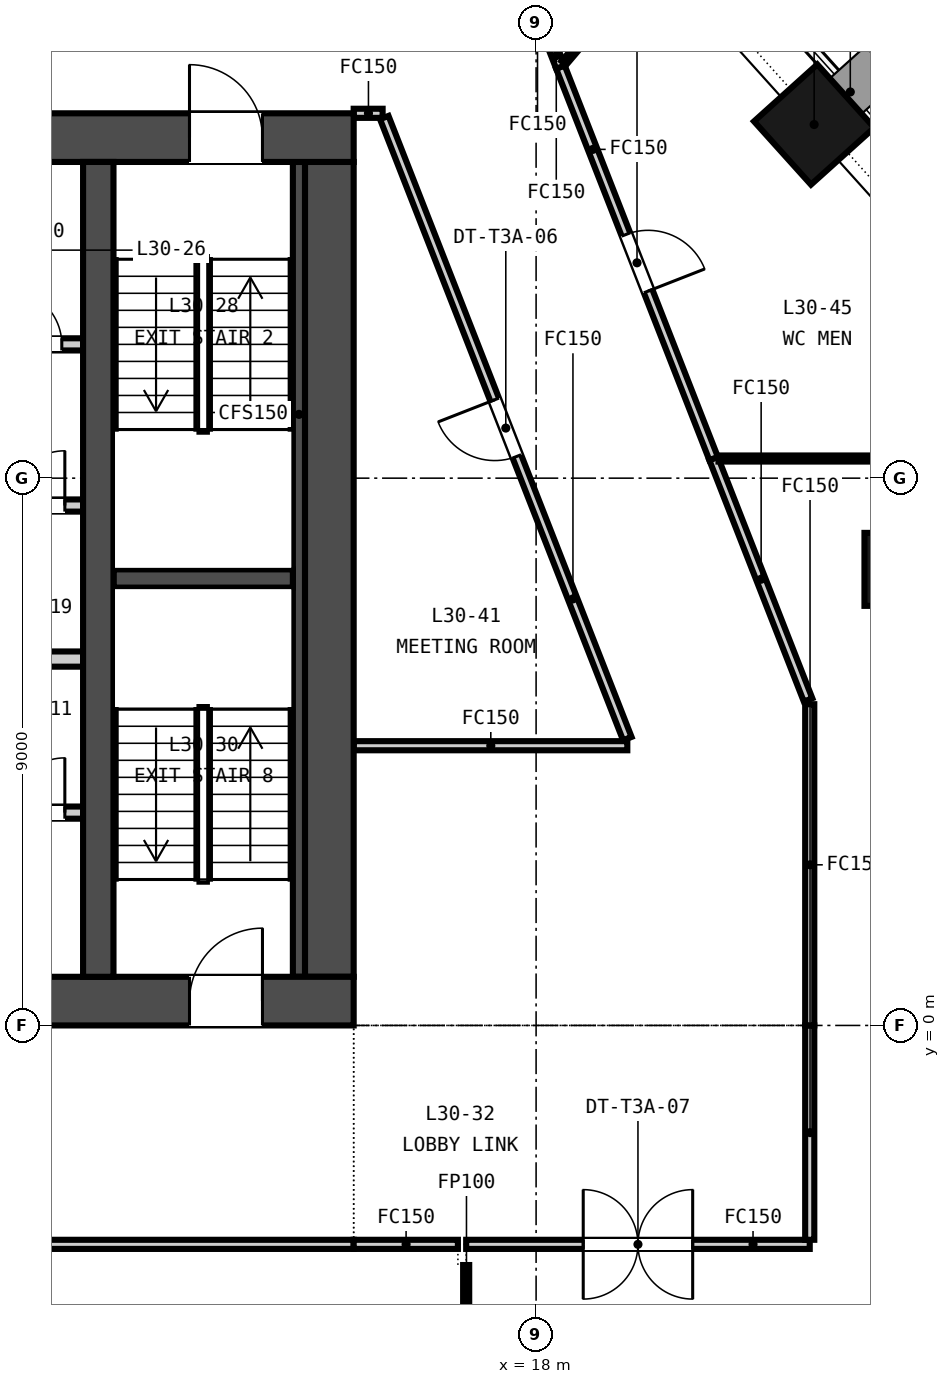
"""IFC4 building model, lengths in metres.
Left out: names, types, materials, properties, quantities, classifications, styles, units other than length and angle.
Written with IfcOpenShell. Run it as: python <this file> out.ifc"""

import sys

from ifc_helpers import new_model, si_unit, direction, frame, frame_2d, origin, origin_2d, place, context, subcontext, project, spatial, rectangle, extrude, element, fill, save


model = new_model("IFC4")
c1 = context("Model", 3, precision=1e-05, world=origin(), true_north=direction((0.0, 1.0)))
c2 = subcontext(c1, "Body", "Model", "MODEL_VIEW")
j1 = project(units=[si_unit("LENGTHUNIT", "METRE"), si_unit("PLANEANGLEUNIT", "RADIAN")], contexts=[c1])
p1 = place(None, origin())
s1 = spatial("IfcSite", under=j1, at=p1, CompositionType="ELEMENT")
p2 = place(p1, origin())
s2 = spatial("IfcBuilding", under=s1, at=p2, CompositionType="ELEMENT")
p3 = place(p2, frame((0.0, 0.0, 126.15)))
s3 = spatial("IfcBuildingStorey", under=s2, at=p3, CompositionType="ELEMENT", Elevation=126.15)
p4 = place(p3, frame((-15.0, 0.4, -0.15), z_axis=(0.0, 0.0, 1.0), x_axis=(1.0, 0.0, 0.0)))
e1 = element("IfcWall", 1, at=p4, inside=s3, PredefinedType="SOLIDWALL", context=c2, shape_type="SweptSolid", body=[
    extrude(rectangle(XDim=30.0, YDim=0.8, at=frame_2d((15.0, 0.0))), origin(), (0.0, 0.0, 1.0), 3.65),
])
p5 = place(p4, frame((5.8, 0.0, 0.15)))
e2 = element("IfcOpeningElement", 2, at=p5, cuts=e1, PredefinedType="OPENING", context=c2, shape_type="SweptSolid", body=[
    extrude(rectangle(XDim=2.4, YDim=2.4, at=frame_2d((1.2, 1.2))), frame((0.0, 0.41, 0.0), z_axis=(0.0, -1.0, 0.0), x_axis=(1.0, 0.0, 0.0)), (0.0, 0.0, 1.0), 0.82),
])
p6 = place(p4, frame((13.8, 0.0, 0.15)))
e3 = element("IfcOpeningElement", 3, at=p6, cuts=e1, PredefinedType="OPENING", context=c2, shape_type="SweptSolid", body=[
    extrude(rectangle(XDim=2.4, YDim=2.4, at=frame_2d((1.2, 1.2))), frame((0.0, 0.41, 0.0), z_axis=(0.0, -1.0, 0.0), x_axis=(1.0, 0.0, 0.0)), (0.0, 0.0, 1.0), 0.82),
])
p7 = place(p4, frame((21.8, 0.0, 0.15)))
e4 = element("IfcOpeningElement", 4, at=p7, cuts=e1, PredefinedType="OPENING", context=c2, shape_type="SweptSolid", body=[
    extrude(rectangle(XDim=2.4, YDim=2.4, at=frame_2d((1.2, 1.2))), frame((0.0, 0.41, 0.0), z_axis=(0.0, -1.0, 0.0), x_axis=(1.0, 0.0, 0.0)), (0.0, 0.0, 1.0), 0.82),
])
p8 = place(p4, frame((1.5, 0.0, 0.15)))
e5 = element("IfcOpeningElement", 5, at=p8, cuts=e1, PredefinedType="OPENING", context=c2, shape_type="SweptSolid", body=[
    extrude(rectangle(XDim=1.2, YDim=2.1, at=frame_2d((0.6, 1.05))), frame((0.0, 0.41, 0.0), z_axis=(0.0, -1.0, 0.0), x_axis=(1.0, 0.0, 0.0)), (0.0, 0.0, 1.0), 0.82),
])
p9 = place(p4, frame((27.3, 0.0, 0.15)))
e6 = element("IfcOpeningElement", 6, at=p9, cuts=e1, PredefinedType="OPENING", context=c2, shape_type="SweptSolid", body=[
    extrude(rectangle(XDim=1.2, YDim=2.1, at=frame_2d((0.6, 1.05))), frame((0.0, 0.41, 0.0), z_axis=(0.0, -1.0, 0.0), x_axis=(1.0, 0.0, 0.0)), (0.0, 0.0, 1.0), 0.82),
])
p10 = place(p3, frame((-15.0, 14.6, -0.15), z_axis=(0.0, 0.0, 1.0), x_axis=(1.0, 0.0, 0.0)))
e7 = element("IfcWall", 7, at=p10, inside=s3, PredefinedType="SOLIDWALL", context=c2, shape_type="SweptSolid", body=[
    extrude(rectangle(XDim=30.0, YDim=0.8, at=frame_2d((15.0, 0.0))), origin(), (0.0, 0.0, 1.0), 3.65),
])
p11 = place(p10, frame((9.25, 0.0, 0.15)))
e8 = element("IfcOpeningElement", 8, at=p11, cuts=e7, PredefinedType="OPENING", context=c2, shape_type="SweptSolid", body=[
    extrude(rectangle(XDim=1.5, YDim=2.1, at=frame_2d((0.75, 1.05))), frame((0.0, 0.41, 0.0), z_axis=(0.0, -1.0, 0.0), x_axis=(1.0, 0.0, 0.0)), (0.0, 0.0, 1.0), 0.82),
])
p12 = place(p10, frame((19.4, 0.0, 0.15)))
e9 = element("IfcOpeningElement", 9, at=p12, cuts=e7, PredefinedType="OPENING", context=c2, shape_type="SweptSolid", body=[
    extrude(rectangle(XDim=1.5, YDim=2.1, at=frame_2d((0.75, 1.05))), frame((0.0, 0.41, 0.0), z_axis=(0.0, -1.0, 0.0), x_axis=(1.0, 0.0, 0.0)), (0.0, 0.0, 1.0), 0.82),
])
p13 = place(p10, frame((1.5, 0.0, 0.15)))
e10 = element("IfcOpeningElement", 10, at=p13, cuts=e7, PredefinedType="OPENING", context=c2, shape_type="SweptSolid", body=[
    extrude(rectangle(XDim=1.2, YDim=2.1, at=frame_2d((0.6, 1.05))), frame((0.0, 0.41, 0.0), z_axis=(0.0, -1.0, 0.0), x_axis=(1.0, 0.0, 0.0)), (0.0, 0.0, 1.0), 0.82),
])
p14 = place(p10, frame((27.3, 0.0, 0.15)))
e11 = element("IfcOpeningElement", 11, at=p14, cuts=e7, PredefinedType="OPENING", context=c2, shape_type="SweptSolid", body=[
    extrude(rectangle(XDim=1.2, YDim=2.1, at=frame_2d((0.6, 1.05))), frame((0.0, 0.41, 0.0), z_axis=(0.0, -1.0, 0.0), x_axis=(1.0, 0.0, 0.0)), (0.0, 0.0, 1.0), 0.82),
])
p15 = place(p3, frame((14.6, 0.8, -0.15), z_axis=(0.0, 0.0, 1.0), x_axis=(0.0, 1.0, 0.0)))
e12 = element("IfcWall", 12, at=p15, inside=s3, PredefinedType="SOLIDWALL", context=c2, shape_type="SweptSolid", body=[
    extrude(rectangle(XDim=13.4, YDim=0.8, at=frame_2d((6.7, 0.0))), origin(), (0.0, 0.0, 1.0), 3.65),
])
p16 = place(p3, frame((10.8, 0.8, -0.15), z_axis=(0.0, 0.0, 1.0), x_axis=(0.0, 1.0, 0.0)))
e13 = element("IfcWall", 13, at=p16, inside=s3, PredefinedType="SOLIDWALL", context=c2, shape_type="SweptSolid", body=[
    extrude(rectangle(XDim=13.4, YDim=0.5, at=frame_2d((6.7, 0.0))), origin(), (0.0, 0.0, 1.0), 3.65),
])
p17 = place(p3, frame((22.573, 14.816, -0.15), z_axis=(0.0, 0.0, 1.0), x_axis=(-0.669130606359, 0.743144825477, 0.0)))
e14 = element("IfcColumn", 14, at=p17, inside=s3, PredefinedType="COLUMN", context=c2, shape_type="SweptSolid", body=[
    extrude(rectangle(XDim=1.4, YDim=1.4, at=origin_2d()), origin(), (0.0, 0.0, 1.0), 3.65),
])
p18 = place(p3, frame((24.0, 7.5, -0.15), z_axis=(0.0, 0.0, 1.0), x_axis=(1.0, 0.0, 0.0)))
e15 = element("IfcColumn", 15, at=p18, inside=s3, PredefinedType="COLUMN", context=c2, shape_type="SweptSolid", body=[
    extrude(rectangle(XDim=1.2, YDim=1.2, at=origin_2d()), origin(), (0.0, 0.0, 1.0), 3.65),
])
p19 = place(p3, frame((-10.55, 3.5, 0.0), z_axis=(0.0, 0.0, 1.0), x_axis=(1.0, 0.0, 0.0)))
e16 = element("IfcWall", 16, at=p19, inside=s3, PredefinedType="PARTITIONING", context=c2, shape_type="SweptSolid", body=[
    extrude(rectangle(XDim=21.1, YDim=0.2, at=frame_2d((10.55, 0.0))), origin(), (0.0, 0.0, 1.0), 3.5),
])
p20 = place(p19, frame((19.9, 0.0, 0.0)))
e17 = element("IfcOpeningElement", 17, at=p20, cuts=e16, PredefinedType="OPENING", context=c2, shape_type="SweptSolid", body=[
    extrude(rectangle(XDim=0.9, YDim=2.1, at=frame_2d((0.45, 1.05))), frame((0.0, 0.11, 0.0), z_axis=(0.0, -1.0, 0.0), x_axis=(1.0, 0.0, 0.0)), (0.0, 0.0, 1.0), 0.22),
])
p21 = place(p3, frame((-10.55, 6.025, 0.0), z_axis=(0.0, 0.0, 1.0), x_axis=(1.0, 0.0, 0.0)))
e18 = element("IfcWall", 18, at=p21, inside=s3, PredefinedType="PARTITIONING", context=c2, shape_type="SweptSolid", body=[
    extrude(rectangle(XDim=21.1, YDim=0.25, at=frame_2d((10.55, 0.0))), origin(), (0.0, 0.0, 1.0), 3.5),
])
p22 = place(p3, frame((-10.55, 8.55, 0.0), z_axis=(0.0, 0.0, 1.0), x_axis=(1.0, 0.0, 0.0)))
e19 = element("IfcWall", 19, at=p22, inside=s3, PredefinedType="PARTITIONING", context=c2, shape_type="SweptSolid", body=[
    extrude(rectangle(XDim=21.1, YDim=0.2, at=frame_2d((10.55, 0.0))), origin(), (0.0, 0.0, 1.0), 3.5),
])
p23 = place(p22, frame((0.675, 0.0, 0.0)))
e20 = element("IfcOpeningElement", 20, at=p23, cuts=e19, PredefinedType="OPENING", context=c2, shape_type="SweptSolid", body=[
    extrude(rectangle(XDim=1.2, YDim=2.1, at=frame_2d((0.6, 1.05))), frame((0.0, 0.11, 0.0), z_axis=(0.0, -1.0, 0.0), x_axis=(1.0, 0.0, 0.0)), (0.0, 0.0, 1.0), 0.22),
])
p24 = place(p22, frame((3.475, 0.0, 0.0)))
e21 = element("IfcOpeningElement", 21, at=p24, cuts=e19, PredefinedType="OPENING", context=c2, shape_type="SweptSolid", body=[
    extrude(rectangle(XDim=1.2, YDim=2.1, at=frame_2d((0.6, 1.05))), frame((0.0, 0.11, 0.0), z_axis=(0.0, -1.0, 0.0), x_axis=(1.0, 0.0, 0.0)), (0.0, 0.0, 1.0), 0.22),
])
p25 = place(p22, frame((6.275, 0.0, 0.0)))
e22 = element("IfcOpeningElement", 22, at=p25, cuts=e19, PredefinedType="OPENING", context=c2, shape_type="SweptSolid", body=[
    extrude(rectangle(XDim=1.2, YDim=2.1, at=frame_2d((0.6, 1.05))), frame((0.0, 0.11, 0.0), z_axis=(0.0, -1.0, 0.0), x_axis=(1.0, 0.0, 0.0)), (0.0, 0.0, 1.0), 0.22),
])
p26 = place(p22, frame((9.075, 0.0, 0.0)))
e23 = element("IfcOpeningElement", 23, at=p26, cuts=e19, PredefinedType="OPENING", context=c2, shape_type="SweptSolid", body=[
    extrude(rectangle(XDim=1.2, YDim=2.1, at=frame_2d((0.6, 1.05))), frame((0.0, 0.11, 0.0), z_axis=(0.0, -1.0, 0.0), x_axis=(1.0, 0.0, 0.0)), (0.0, 0.0, 1.0), 0.22),
])
p27 = place(p22, frame((11.875, 0.0, 0.0)))
e24 = element("IfcOpeningElement", 24, at=p27, cuts=e19, PredefinedType="OPENING", context=c2, shape_type="SweptSolid", body=[
    extrude(rectangle(XDim=1.2, YDim=2.1, at=frame_2d((0.6, 1.05))), frame((0.0, 0.11, 0.0), z_axis=(0.0, -1.0, 0.0), x_axis=(1.0, 0.0, 0.0)), (0.0, 0.0, 1.0), 0.22),
])
p28 = place(p22, frame((14.675, 0.0, 0.0)))
e25 = element("IfcOpeningElement", 25, at=p28, cuts=e19, PredefinedType="OPENING", context=c2, shape_type="SweptSolid", body=[
    extrude(rectangle(XDim=1.2, YDim=2.1, at=frame_2d((0.6, 1.05))), frame((0.0, 0.11, 0.0), z_axis=(0.0, -1.0, 0.0), x_axis=(1.0, 0.0, 0.0)), (0.0, 0.0, 1.0), 0.22),
])
p29 = place(p22, frame((17.475, 0.0, 0.0)))
e26 = element("IfcOpeningElement", 26, at=p29, cuts=e19, PredefinedType="OPENING", context=c2, shape_type="SweptSolid", body=[
    extrude(rectangle(XDim=1.2, YDim=2.1, at=frame_2d((0.6, 1.05))), frame((0.0, 0.11, 0.0), z_axis=(0.0, -1.0, 0.0), x_axis=(1.0, 0.0, 0.0)), (0.0, 0.0, 1.0), 0.22),
])
p30 = place(p22, frame((19.9, 0.0, 0.0)))
e27 = element("IfcOpeningElement", 27, at=p30, cuts=e19, PredefinedType="OPENING", context=c2, shape_type="SweptSolid", body=[
    extrude(rectangle(XDim=0.9, YDim=2.1, at=frame_2d((0.45, 1.05))), frame((0.0, 0.11, 0.0), z_axis=(0.0, -1.0, 0.0), x_axis=(1.0, 0.0, 0.0)), (0.0, 0.0, 1.0), 0.22),
])
p31 = place(p3, frame((5.9, 11.2, 0.0), z_axis=(0.0, 0.0, 1.0), x_axis=(1.0, 0.0, 0.0)))
e28 = element("IfcWall", 28, at=p31, inside=s3, PredefinedType="PARTITIONING", context=c2, shape_type="SweptSolid", body=[
    extrude(rectangle(XDim=4.65, YDim=0.2, at=frame_2d((2.325, 0.0))), origin(), (0.0, 0.0, 1.0), 3.5),
])
p32 = place(p31, frame((3.4, 0.0, 0.0)))
e29 = element("IfcOpeningElement", 29, at=p32, cuts=e28, PredefinedType="OPENING", context=c2, shape_type="SweptSolid", body=[
    extrude(rectangle(XDim=0.9, YDim=2.1, at=frame_2d((0.45, 1.05))), frame((0.0, 0.11, 0.0), z_axis=(0.0, -1.0, 0.0), x_axis=(1.0, 0.0, 0.0)), (0.0, 0.0, 1.0), 0.22),
])
p33 = place(p3, frame((11.05, 7.35, 0.0), z_axis=(0.0, 0.0, 1.0), x_axis=(1.0, 0.0, 0.0)))
e30 = element("IfcWall", 30, at=p33, inside=s3, PredefinedType="SOLIDWALL", context=c2, shape_type="SweptSolid", body=[
    extrude(rectangle(XDim=2.95, YDim=0.3, at=frame_2d((1.475, 0.0))), origin(), (0.0, 0.0, 1.0), 3.5),
])
p34 = place(p3, frame((14.1, 0.8, 0.0), z_axis=(0.0, 0.0, 1.0), x_axis=(0.0, 1.0, 0.0)))
e31 = element("IfcWall", 31, at=p34, inside=s3, PredefinedType="SOLIDWALL", context=c2, shape_type="SweptSolid", body=[
    extrude(rectangle(XDim=13.4, YDim=0.2, at=frame_2d((6.7, 0.0))), origin(), (0.0, 0.0, 1.0), 3.5),
])
p35 = place(p3, frame((15.0, -3.6, 0.0), z_axis=(0.0, 0.0, 1.0), x_axis=(-1.0, 0.0, 0.0)))
e32 = element("IfcWall", 32, at=p35, inside=s3, PredefinedType="PARTITIONING", context=c2, shape_type="SweptSolid", body=[
    extrude(rectangle(XDim=30.0, YDim=0.15, at=frame_2d((15.0, 0.0))), origin(), (0.0, 0.0, 1.0), 2.741),
])
p36 = place(p35, frame((14.1, 0.0, 0.0)))
e33 = element("IfcOpeningElement", 33, at=p36, cuts=e32, PredefinedType="OPENING", context=c2, shape_type="SweptSolid", body=[
    extrude(rectangle(XDim=1.8, YDim=2.1, at=frame_2d((0.9, 1.05))), frame((0.0, 0.085, 0.0), z_axis=(0.0, -1.0, 0.0), x_axis=(1.0, 0.0, 0.0)), (0.0, 0.0, 1.0), 0.17),
])
p37 = place(p3, frame((22.5, -3.6, 0.0), z_axis=(0.0, 0.0, 1.0), x_axis=(-1.0, 0.0, 0.0)))
e34 = element("IfcWall", 34, at=p37, inside=s3, PredefinedType="PARTITIONING", context=c2, shape_type="SweptSolid", body=[
    extrude(rectangle(XDim=5.65, YDim=0.15, at=frame_2d((2.825, 0.0))), origin(), (0.0, 0.0, 1.0), 2.741),
])
p38 = place(p37, frame((1.925, 0.0, 0.0)))
e35 = element("IfcOpeningElement", 35, at=p38, cuts=e34, PredefinedType="OPENING", context=c2, shape_type="SweptSolid", body=[
    extrude(rectangle(XDim=1.8, YDim=2.1, at=frame_2d((0.9, 1.05))), frame((0.0, 0.085, 0.0), z_axis=(0.0, -1.0, 0.0), x_axis=(1.0, 0.0, 0.0)), (0.0, 0.0, 1.0), 0.17),
])
p39 = place(p3, frame((22.5, 0.0, 0.0), z_axis=(0.0, 0.0, 1.0), x_axis=(0.0, -1.0, 0.0)))
e36 = element("IfcWall", 36, at=p39, inside=s3, PredefinedType="PARTITIONING", context=c2, shape_type="SweptSolid", body=[
    extrude(rectangle(XDim=3.525, YDim=0.15, at=frame_2d((1.762, 0.0))), origin(), (0.0, 0.0, 1.0), 2.741),
])
p40 = place(p3, frame((16.714, -3.6, 0.0), z_axis=(0.0, 0.0, 1.0), x_axis=(-1.0, 0.0, 0.0)))
e37 = element("IfcWall", 37, at=p40, inside=s3, PredefinedType="PARTITIONING", context=c2, shape_type="SweptSolid", body=[
    extrude(rectangle(XDim=1.714, YDim=0.15, at=frame_2d((0.857, 0.0))), origin(), (0.0, 0.0, 1.0), 2.741),
])
p41 = place(p3, frame((15.476, 15.0, 0.0), z_axis=(0.0, 0.0, 1.0), x_axis=(-1.0, 0.0, 0.0)))
e38 = element("IfcWall", 38, at=p41, inside=s3, PredefinedType="PARTITIONING", context=c2, shape_type="SweptSolid", body=[
    extrude(rectangle(XDim=0.476, YDim=0.15, at=frame_2d((0.238, 0.0))), origin(), (0.0, 0.0, 1.0), 2.741),
])
p42 = place(p3, frame((19.5, 4.717, 0.0), z_axis=(0.0, 0.0, 1.0), x_axis=(-0.364410260026, 0.931238509936, 0.0)))
e39 = element("IfcWall", 39, at=p42, inside=s3, PredefinedType="PARTITIONING", context=c2, shape_type="SweptSolid", body=[
    extrude(rectangle(XDim=10.967, YDim=0.15, at=frame_2d((5.484, 0.0))), origin(), (0.0, 0.0, 1.0), 2.741),
])
p43 = place(p42, frame((4.984, 0.0, 0.0)))
e40 = element("IfcOpeningElement", 40, at=p43, cuts=e39, PredefinedType="OPENING", context=c2, shape_type="SweptSolid", body=[
    extrude(rectangle(XDim=1.0, YDim=2.1, at=frame_2d((0.5, 1.05))), frame((0.0, 0.085, 0.0), z_axis=(0.0, -1.0, 0.0), x_axis=(1.0, 0.0, 0.0)), (0.0, 0.0, 1.0), 0.17),
])
p44 = place(p3, frame((22.5, 5.283, 0.0), z_axis=(0.0, 0.0, 1.0), x_axis=(0.0, -1.0, 0.0)))
e41 = element("IfcWall", 41, at=p44, inside=s3, PredefinedType="PARTITIONING", context=c2, shape_type="SweptSolid", body=[
    extrude(rectangle(XDim=5.283, YDim=0.15, at=frame_2d((2.642, 0.0))), origin(), (0.0, 0.0, 1.0), 2.741),
])
p45 = place(p3, frame((15.0, 4.6, 0.0), z_axis=(0.0, 0.0, 1.0), x_axis=(1.0, 0.0, 0.0)))
e42 = element("IfcWall", 42, at=p45, inside=s3, PredefinedType="PARTITIONING", context=c2, shape_type="SweptSolid", body=[
    extrude(rectangle(XDim=4.5, YDim=0.15, at=frame_2d((2.25, 0.0))), origin(), (0.0, 0.0, 1.0), 2.741),
])
p46 = place(p3, frame((20.919, 9.323, 0.0), z_axis=(0.0, 0.0, 1.0), x_axis=(0.364429576393, -0.931230950865, 0.0)))
e43 = element("IfcWall", 43, at=p46, inside=s3, PredefinedType="PARTITIONING", context=c2, shape_type="SweptSolid", body=[
    extrude(rectangle(XDim=4.263, YDim=0.15, at=frame_2d((2.132, 0.0))), origin(), (0.0, 0.0, 1.0), 2.741),
])
p47 = place(p3, frame((16.85, -9.736, 0.0), z_axis=(0.0, 0.0, 1.0), x_axis=(0.0, 1.0, 0.0)))
e44 = element("IfcWall", 44, at=p47, inside=s3, PredefinedType="PARTITIONING", context=c2, shape_type="SweptSolid", body=[
    extrude(rectangle(XDim=5.796, YDim=0.1, at=frame_2d((2.898, 0.0))), origin(), (0.0, 0.0, 1.0), 2.741),
])
p48 = place(p3, frame((18.4, 15.76, 0.0), z_axis=(0.0, 0.0, 1.0), x_axis=(0.364425982763, -0.931232357195, 0.0)))
e45 = element("IfcWall", 45, at=p48, inside=s3, PredefinedType="PARTITIONING", context=c2, shape_type="SweptSolid", body=[
    extrude(rectangle(XDim=6.912, YDim=0.15, at=frame_2d((3.456, 0.0))), origin(), (0.0, 0.0, 1.0), 2.741),
])
p49 = place(p48, frame((2.956, 0.0, 0.0)))
e46 = element("IfcOpeningElement", 46, at=p49, cuts=e45, PredefinedType="OPENING", context=c2, shape_type="SweptSolid", body=[
    extrude(rectangle(XDim=1.0, YDim=2.1, at=frame_2d((0.5, 1.05))), frame((0.0, 0.085, 0.0), z_axis=(0.0, -1.0, 0.0), x_axis=(1.0, 0.0, 0.0)), (0.0, 0.0, 1.0), 0.17),
])
p50 = place(p3, frame((21.0, 9.323, 0.0), z_axis=(0.0, 0.0, 1.0), x_axis=(1.0, 0.0, 0.0)))
e47 = element("IfcWall", 47, at=p50, inside=s3, PredefinedType="PARTITIONING", context=c2, shape_type="SweptSolid", body=[
    extrude(rectangle(XDim=6.653, YDim=0.1, at=frame_2d((3.326, 0.0))), origin(), (0.0, 0.0, 1.0), 2.741),
])
p51 = place(p3, frame((18.253, 16.135, 0.0), z_axis=(0.0, 0.0, 1.0), x_axis=(0.36385052714, -0.93145734948, 0.0)))
e48 = element("IfcWall", 48, at=p51, inside=s3, PredefinedType="PARTITIONING", context=c2, shape_type="SweptSolid", body=[
    extrude(rectangle(XDim=0.403, YDim=0.15, at=frame_2d((0.201, 0.0))), origin(), (0.0, 0.0, 1.0), 2.741),
])
p52 = place(p3, frame((18.455, 15.825, 0.0), z_axis=(0.0, 0.0, 1.0), x_axis=(0.647780060511, 0.761827403815, 0.0)))
e49 = element("IfcWall", 49, at=p52, inside=s3, PredefinedType="PARTITIONING", context=c2, shape_type="SweptSolid", body=[
    extrude(rectangle(XDim=2.207, YDim=0.1, at=frame_2d((1.104, 0.0))), origin(), (0.0, 0.0, 1.0), 2.741),
])
p53 = place(p20, origin())
e50 = element("IfcDoor", 50, at=p53, inside=s3, OperationType="SINGLE_SWING_RIGHT", PredefinedType="DOOR", context=c2, shape_type="SweptSolid", body=[
    extrude(rectangle(XDim=0.9, YDim=2.1, at=frame_2d((0.45, 1.05))), frame((0.0, 0.025, 0.0), z_axis=(0.0, -1.0, 0.0), x_axis=(1.0, 0.0, 0.0)), (0.0, 0.0, 1.0), 0.05),
])
fill(e17, e50)
p54 = place(p30, origin())
e51 = element("IfcDoor", 51, at=p54, inside=s3, OperationType="SINGLE_SWING_RIGHT", PredefinedType="DOOR", context=c2, shape_type="SweptSolid", body=[
    extrude(rectangle(XDim=0.9, YDim=2.1, at=frame_2d((0.45, 1.05))), frame((0.0, 0.025, 0.0), z_axis=(0.0, -1.0, 0.0), x_axis=(1.0, 0.0, 0.0)), (0.0, 0.0, 1.0), 0.05),
])
fill(e27, e51)
p55 = place(p32, origin())
e52 = element("IfcDoor", 52, at=p55, inside=s3, OperationType="SINGLE_SWING_LEFT", PredefinedType="DOOR", context=c2, shape_type="SweptSolid", body=[
    extrude(rectangle(XDim=0.9, YDim=2.1, at=frame_2d((0.45, 1.05))), frame((0.0, 0.025, 0.0), z_axis=(0.0, -1.0, 0.0), x_axis=(1.0, 0.0, 0.0)), (0.0, 0.0, 1.0), 0.05),
])
fill(e29, e52)
p56 = place(p14, origin())
e53 = element("IfcDoor", 53, at=p56, inside=s3, OperationType="SINGLE_SWING_LEFT", PredefinedType="DOOR", context=c2, shape_type="SweptSolid", body=[
    extrude(rectangle(XDim=1.2, YDim=2.1, at=frame_2d((0.6, 1.05))), frame((0.0, 0.025, 0.0), z_axis=(0.0, -1.0, 0.0), x_axis=(1.0, 0.0, 0.0)), (0.0, 0.0, 1.0), 0.05),
])
fill(e11, e53)
p57 = place(p9, origin())
e54 = element("IfcDoor", 54, at=p57, inside=s3, OperationType="SINGLE_SWING_RIGHT", PredefinedType="DOOR", context=c2, shape_type="SweptSolid", body=[
    extrude(rectangle(XDim=1.2, YDim=2.1, at=frame_2d((0.6, 1.05))), frame((0.0, 0.025, 0.0), z_axis=(0.0, -1.0, 0.0), x_axis=(1.0, 0.0, 0.0)), (0.0, 0.0, 1.0), 0.05),
])
fill(e6, e54)
p58 = place(p43, origin())
e55 = element("IfcDoor", 55, at=p58, inside=s3, OperationType="SINGLE_SWING_RIGHT", PredefinedType="DOOR", context=c2, shape_type="SweptSolid", body=[
    extrude(rectangle(XDim=1.0, YDim=2.1, at=frame_2d((0.5, 1.05))), frame((0.0, 0.025, 0.0), z_axis=(0.0, -1.0, 0.0), x_axis=(1.0, 0.0, 0.0)), (0.0, 0.0, 1.0), 0.05),
])
fill(e40, e55)
p59 = place(p38, origin())
e56 = element("IfcDoor", 56, at=p59, inside=s3, OperationType="DOUBLE_DOOR_DOUBLE_SWING", PredefinedType="DOOR", context=c2, shape_type="SweptSolid", body=[
    extrude(rectangle(XDim=1.8, YDim=2.1, at=frame_2d((0.9, 1.05))), frame((0.0, 0.025, 0.0), z_axis=(0.0, -1.0, 0.0), x_axis=(1.0, 0.0, 0.0)), (0.0, 0.0, 1.0), 0.05),
])
fill(e35, e56)
p60 = place(p49, origin())
e57 = element("IfcDoor", 57, at=p60, inside=s3, OperationType="SINGLE_SWING_RIGHT", PredefinedType="DOOR", context=c2, shape_type="SweptSolid", body=[
    extrude(rectangle(XDim=1.0, YDim=2.1, at=frame_2d((0.5, 1.05))), frame((0.0, 0.025, 0.0), z_axis=(0.0, -1.0, 0.0), x_axis=(1.0, 0.0, 0.0)), (0.0, 0.0, 1.0), 0.05),
])
fill(e46, e57)
save(model, sys.argv[1])
